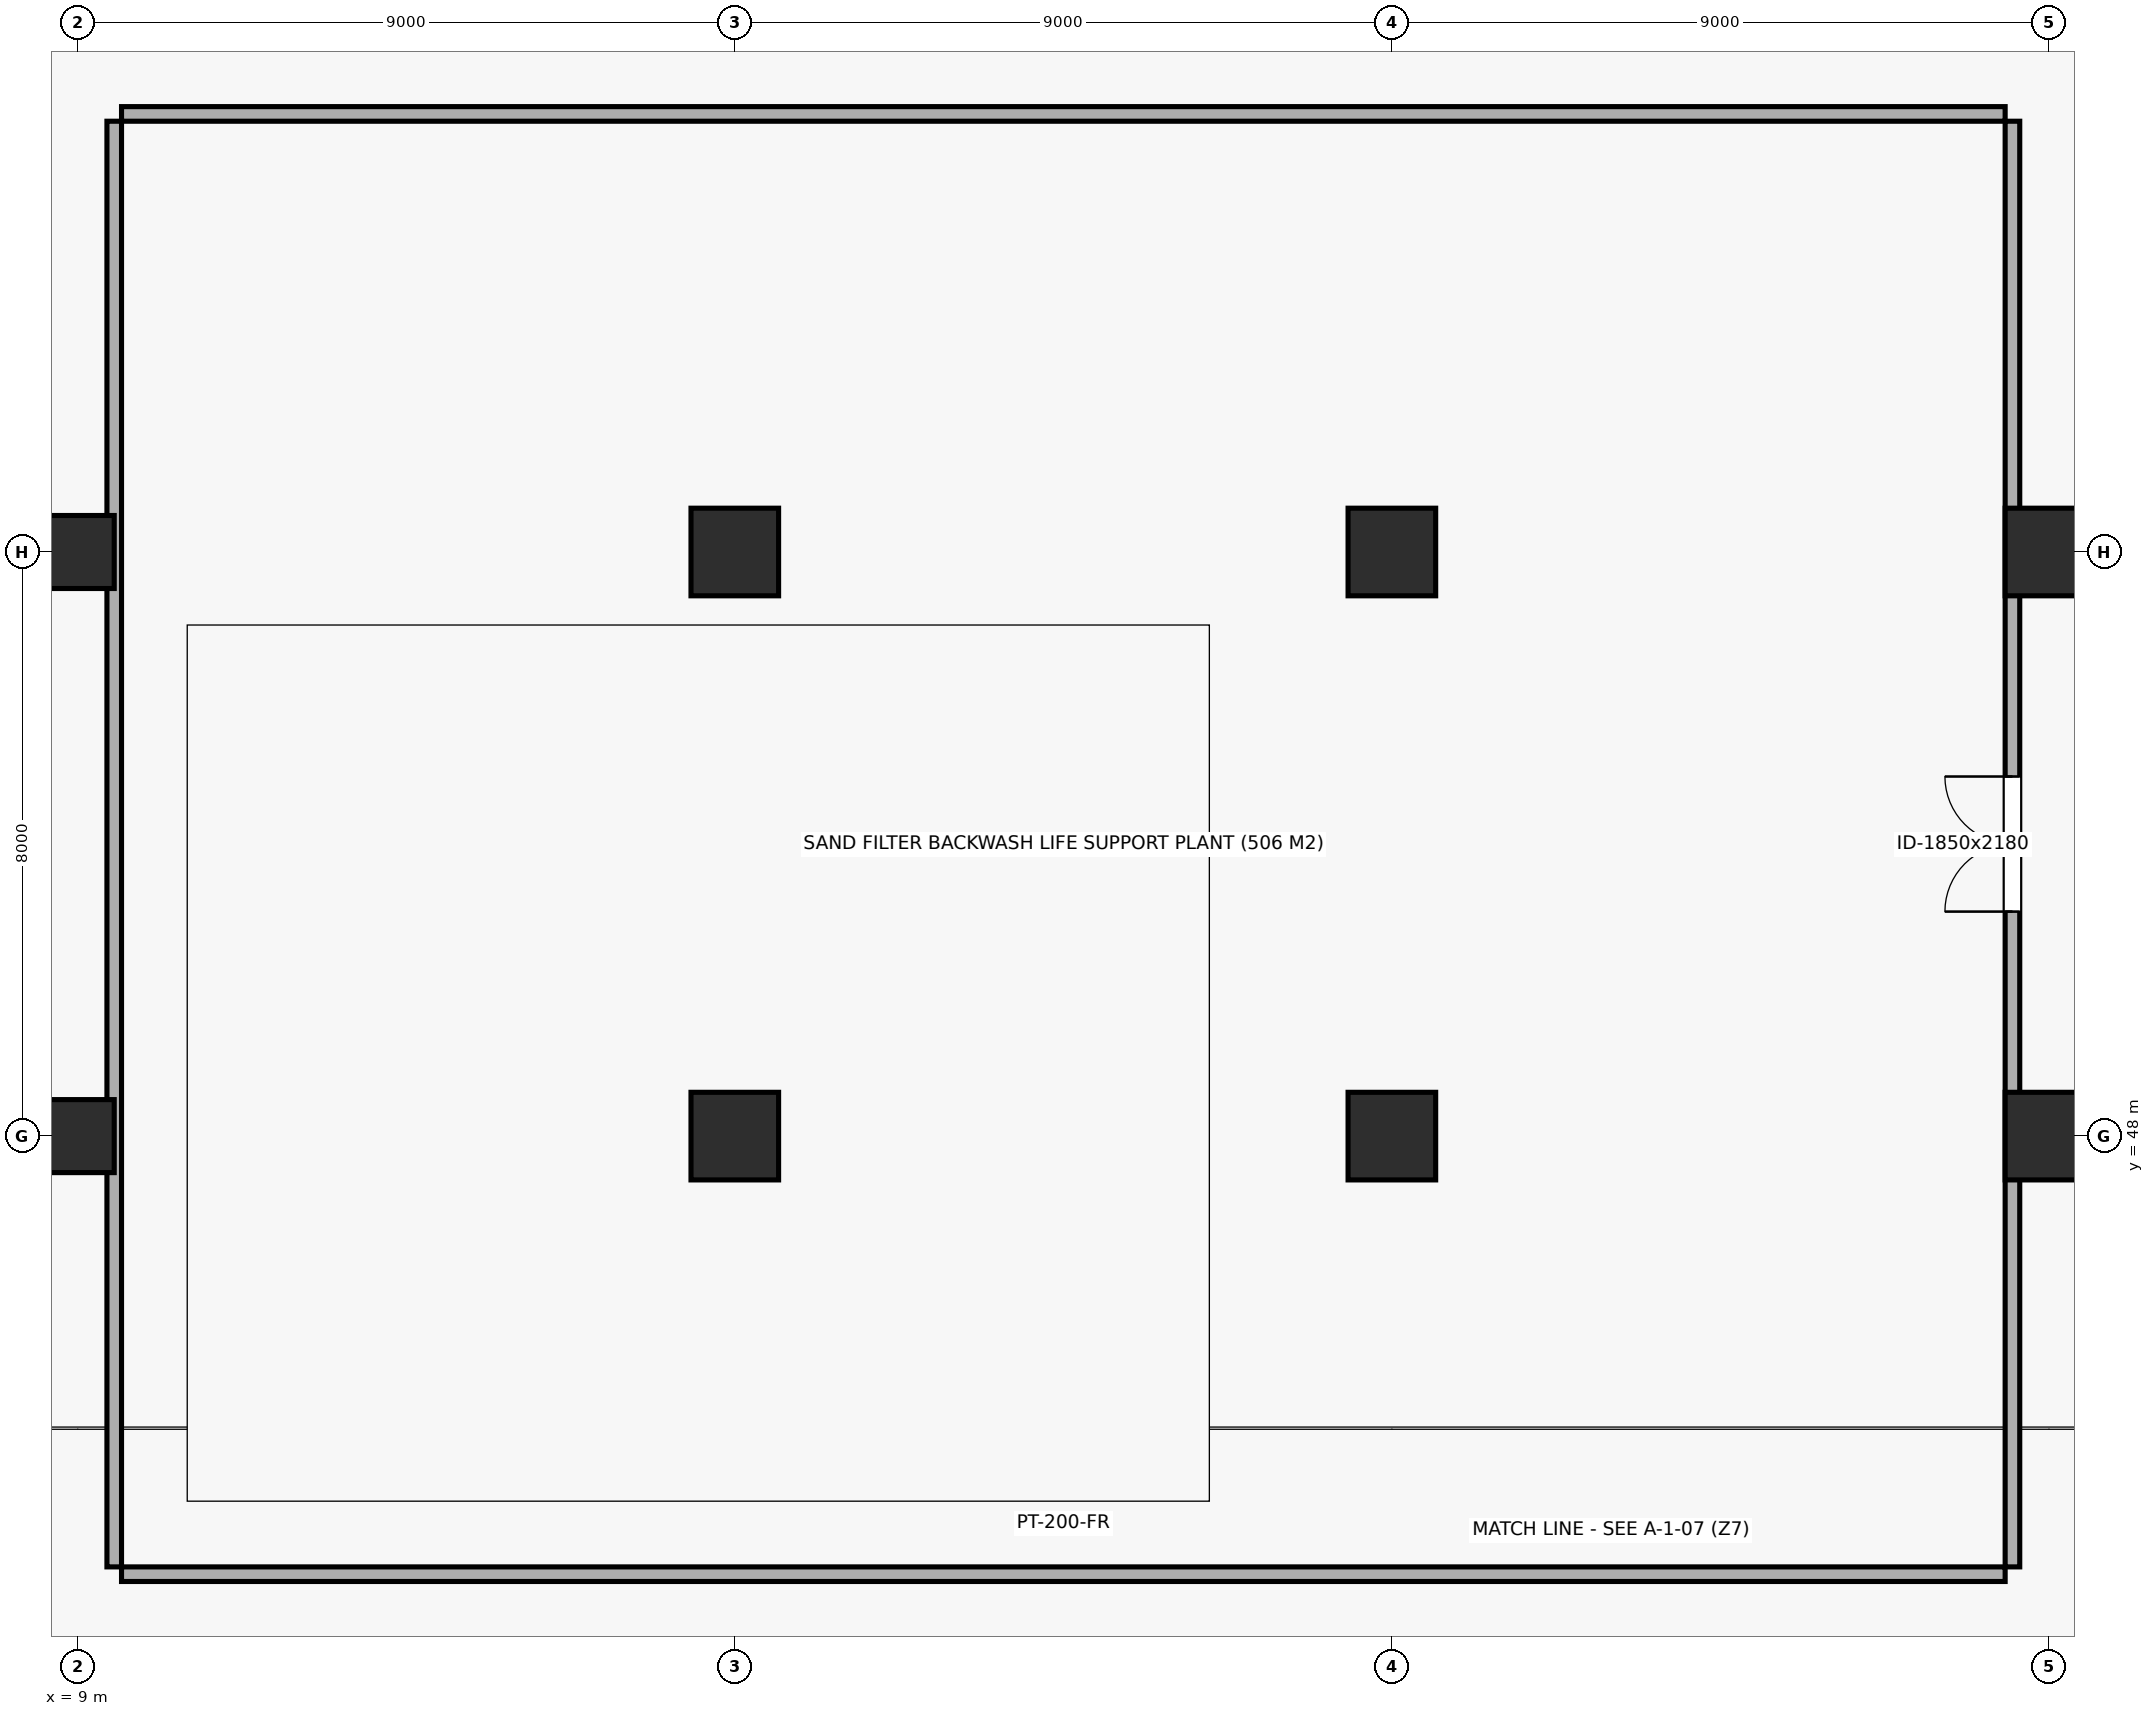
"""IFC4 building model, lengths in metres.
Left out: names, types, materials, properties, quantities, classifications, styles, units other than length and angle.
Written with IfcOpenShell. Run it as: python <this file> out.ifc"""

import sys

from ifc_helpers import new_model, si_unit, direction, frame, frame_2d, origin, origin_2d, place, context, subcontext, project, spatial, rectangle, extrude, element, fill, save


model = new_model("IFC4")
c1 = context("Model", 3, precision=1e-05, world=origin(), true_north=direction((0.0, 1.0)))
c2 = subcontext(c1, "Body", "Model", "MODEL_VIEW")
j1 = project(units=[si_unit("LENGTHUNIT", "METRE"), si_unit("PLANEANGLEUNIT", "RADIAN")], contexts=[c1])
p1 = place(None, origin())
s1 = spatial("IfcSite", under=j1, at=p1, CompositionType="ELEMENT")
p2 = place(p1, origin())
s2 = spatial("IfcBuilding", under=s1, at=p2, CompositionType="ELEMENT")
p3 = place(p2, frame((0.0, 0.0, -9.0)))
s3 = spatial("IfcBuildingStorey", under=s2, at=p3, CompositionType="ELEMENT", Elevation=-9.0)
for number, where, z_axis, x_axis in (
    (1, (9.0, 48.0, 0.0), (0.0, 0.0, 1.0), (1.0, 0.0, 0.0)),
    (2, (9.0, 56.0, 0.0), (0.0, 0.0, 1.0), (1.0, 0.0, 0.0)),
):
    element("IfcColumn", number, at=place(p3, frame(where, z_axis=z_axis, x_axis=x_axis)), inside=s3, PredefinedType="COLUMN", context=c2, shape_type="SweptSolid", body=[
        extrude(rectangle(XDim=1.0, YDim=1.0, at=origin_2d()), origin(), (0.0, 0.0, 1.0), 4.5),
    ])
for number, where, z_axis, x_axis in (
    (3, (18.0, 48.0, 0.0), (0.0, 0.0, 1.0), (1.0, 0.0, 0.0)),
    (4, (18.0, 56.0, 0.0), (0.0, 0.0, 1.0), (1.0, 0.0, 0.0)),
    (5, (27.0, 48.0, 0.0), (0.0, 0.0, 1.0), (1.0, 0.0, 0.0)),
    (6, (27.0, 56.0, 0.0), (0.0, 0.0, 1.0), (1.0, 0.0, 0.0)),
    (7, (36.0, 48.0, 0.0), (0.0, 0.0, 1.0), (1.0, 0.0, 0.0)),
    (8, (36.0, 56.0, 0.0), (0.0, 0.0, 1.0), (1.0, 0.0, 0.0)),
):
    element("IfcColumn", number, at=place(p3, frame(where, z_axis=z_axis, x_axis=x_axis)), inside=s3, PredefinedType="COLUMN", context=c2, shape_type="SweptSolid", body=[
        extrude(rectangle(XDim=1.2, YDim=1.2, at=origin_2d()), origin(), (0.0, 0.0, 1.0), 4.5),
    ])
for number, where, z_axis, x_axis in (
    (9, (9.6, 42.0, 0.0), (0.0, 0.0, 1.0), (1.0, 0.0, 0.0)),
    (10, (9.6, 62.0, 0.0), (0.0, 0.0, 1.0), (1.0, 0.0, 0.0)),
):
    element("IfcWall", number, at=place(p3, frame(where, z_axis=z_axis, x_axis=x_axis)), inside=s3, PredefinedType="PARTITIONING", context=c2, shape_type="SweptSolid", body=[
        extrude(rectangle(XDim=25.8, YDim=0.2, at=frame_2d((12.9, 0.0))), origin(), (0.0, 0.0, 1.0), 4.2),
    ])
p4 = place(p3, frame((9.5, 42.1, 0.0), z_axis=(0.0, 0.0, 1.0), x_axis=(0.0, 1.0, 0.0)))
e11 = element("IfcWall", 11, at=p4, inside=s3, PredefinedType="PARTITIONING", context=c2, shape_type="SweptSolid", body=[
    extrude(rectangle(XDim=19.8, YDim=0.2, at=frame_2d((9.9, 0.0))), origin(), (0.0, 0.0, 1.0), 4.2),
])
p5 = place(p3, frame((35.5, 42.1, 0.0), z_axis=(0.0, 0.0, 1.0), x_axis=(0.0, 1.0, 0.0)))
e12 = element("IfcWall", 12, at=p5, inside=s3, PredefinedType="PARTITIONING", context=c2, shape_type="SweptSolid", body=[
    extrude(rectangle(XDim=19.8, YDim=0.2, at=frame_2d((9.9, 0.0))), origin(), (0.0, 0.0, 1.0), 4.2),
])
p6 = place(p5, frame((8.975, 0.0, 0.0)))
e13 = element("IfcOpeningElement", 13, at=p6, cuts=e12, PredefinedType="OPENING", context=c2, shape_type="SweptSolid", body=[
    extrude(rectangle(XDim=1.85, YDim=2.18, at=frame_2d((0.925, 1.09))), frame((0.0, 0.112, 0.0), z_axis=(0.0, -1.0, 0.0), x_axis=(1.0, 0.0, 0.0)), (0.0, 0.0, 1.0), 0.224),
])
p7 = place(p6, origin())
e14 = element("IfcDoor", 14, at=p7, inside=s3, OperationType="DOUBLE_DOOR_SINGLE_SWING", PredefinedType="DOOR", context=c2, shape_type="SweptSolid", body=[
    extrude(rectangle(XDim=1.85, YDim=2.18, at=frame_2d((0.925, 1.09))), frame((0.0, 0.025, 0.0), z_axis=(0.0, -1.0, 0.0), x_axis=(1.0, 0.0, 0.0)), (0.0, 0.0, 1.0), 0.05),
])
fill(e13, e14)
save(model, sys.argv[1])
